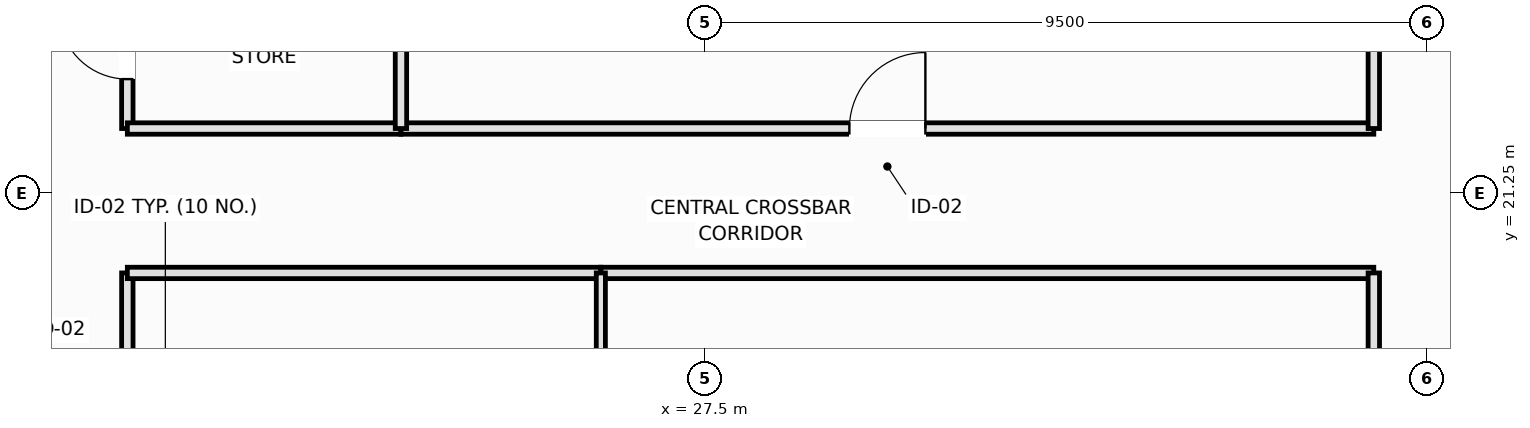
"""IFC4 building model, lengths in metres.
Left out: names, types, materials, properties, quantities, classifications, styles, units other than length and angle.
Written with IfcOpenShell. Run it as: python <this file> out.ifc"""

import sys

from ifc_helpers import new_model, si_unit, direction, frame, frame_2d, origin, place, context, subcontext, project, spatial, rectangle, extrude, element, fill, save


model = new_model("IFC4")
c1 = context("Model", 3, precision=1e-05, world=origin(), true_north=direction((0.0, 1.0)))
c2 = subcontext(c1, "Body", "Model", "MODEL_VIEW")
j1 = project(units=[si_unit("LENGTHUNIT", "METRE"), si_unit("PLANEANGLEUNIT", "RADIAN")], contexts=[c1])
p1 = place(None, origin())
s1 = spatial("IfcSite", under=j1, at=p1, CompositionType="ELEMENT")
p2 = place(p1, origin())
s2 = spatial("IfcBuilding", under=s1, at=p2, CompositionType="ELEMENT")
p3 = place(p2, frame((0.0, 0.0, 270.55)))
s3 = spatial("IfcBuildingStorey", under=s2, at=p3, CompositionType="ELEMENT", Elevation=270.55)
p4 = place(p3, frame((19.9, 15.9, 0.0), z_axis=(0.0, 0.0, 1.0), x_axis=(0.0, 1.0, 0.0)))
e1 = element("IfcWall", 1, at=p4, inside=s3, PredefinedType="PARTITIONING", context=c2, shape_type="SweptSolid", body=[
    extrude(rectangle(XDim=4.3, YDim=0.15, at=frame_2d((2.15, 0.0))), origin(), (0.0, 0.0, 1.0), 3.39),
])
p5 = place(p4, frame((1.65, 0.0, 0.0)))
e2 = element("IfcOpeningElement", 2, at=p5, cuts=e1, PredefinedType="OPENING", context=c2, shape_type="SweptSolid", body=[
    extrude(rectangle(XDim=1.0, YDim=2.15, at=frame_2d((0.5, 1.075))), frame((0.0, 0.085, 0.0), z_axis=(0.0, -1.0, 0.0), x_axis=(1.0, 0.0, 0.0)), (0.0, 0.0, 1.0), 0.17),
])
p6 = place(p3, frame((19.9, 22.1, 0.0), z_axis=(0.0, 0.0, 1.0), x_axis=(0.0, 1.0, 0.0)))
e3 = element("IfcWall", 3, at=p6, inside=s3, PredefinedType="PLUMBINGWALL", context=c2, shape_type="SweptSolid", body=[
    extrude(rectangle(XDim=2.2, YDim=0.15, at=frame_2d((1.1, 0.0))), origin(), (0.0, 0.0, 1.0), 3.39),
])
p7 = place(p6, frame((0.65, 0.0, 0.0)))
e4 = element("IfcOpeningElement", 4, at=p7, cuts=e3, PredefinedType="OPENING", context=c2, shape_type="SweptSolid", body=[
    extrude(rectangle(XDim=0.9, YDim=2.1, at=frame_2d((0.45, 1.05))), frame((0.0, 0.085, 0.0), z_axis=(0.0, -1.0, 0.0), x_axis=(1.0, 0.0, 0.0)), (0.0, 0.0, 1.0), 0.17),
])
p8 = place(p3, frame((19.9, 20.2, 0.0), z_axis=(0.0, 0.0, 1.0), x_axis=(1.0, 0.0, 0.0)))
e5 = element("IfcWall", 5, at=p8, inside=s3, PredefinedType="PARTITIONING", context=c2, shape_type="SweptSolid", body=[
    extrude(rectangle(XDim=6.23, YDim=0.15, at=frame_2d((3.115, 0.0))), origin(), (0.0, 0.0, 1.0), 3.39),
])
p9 = place(p3, frame((26.13, 20.2, 0.0), z_axis=(0.0, 0.0, 1.0), x_axis=(1.0, 0.0, 0.0)))
e6 = element("IfcWall", 6, at=p9, inside=s3, PredefinedType="PARTITIONING", context=c2, shape_type="SweptSolid", body=[
    extrude(rectangle(XDim=10.17, YDim=0.15, at=frame_2d((5.085, 0.0))), origin(), (0.0, 0.0, 1.0), 3.39),
])
p10 = place(p3, frame((19.9, 22.1, 0.0), z_axis=(0.0, 0.0, 1.0), x_axis=(1.0, 0.0, 0.0)))
e7 = element("IfcWall", 7, at=p10, inside=s3, PredefinedType="PLUMBINGWALL", context=c2, shape_type="SweptSolid", body=[
    extrude(rectangle(XDim=3.6, YDim=0.15, at=frame_2d((1.8, 0.0))), origin(), (0.0, 0.0, 1.0), 3.39),
])
p11 = place(p3, frame((23.5, 22.1, 0.0), z_axis=(0.0, 0.0, 1.0), x_axis=(1.0, 0.0, 0.0)))
e8 = element("IfcWall", 8, at=p11, inside=s3, PredefinedType="PARTITIONING", context=c2, shape_type="SweptSolid", body=[
    extrude(rectangle(XDim=12.8, YDim=0.15, at=frame_2d((6.4, 0.0))), origin(), (0.0, 0.0, 1.0), 3.39),
])
p12 = place(p11, frame((5.9, 0.0, 0.0)))
e9 = element("IfcOpeningElement", 9, at=p12, cuts=e8, PredefinedType="OPENING", context=c2, shape_type="SweptSolid", body=[
    extrude(rectangle(XDim=1.0, YDim=2.15, at=frame_2d((0.5, 1.075))), frame((0.0, 0.085, 0.0), z_axis=(0.0, -1.0, 0.0), x_axis=(1.0, 0.0, 0.0)), (0.0, 0.0, 1.0), 0.17),
])
p13 = place(p3, frame((36.3, 15.9, 0.0), z_axis=(0.0, 0.0, 1.0), x_axis=(0.0, 1.0, 0.0)))
e10 = element("IfcWall", 10, at=p13, inside=s3, PredefinedType="PARTITIONING", context=c2, shape_type="SweptSolid", body=[
    extrude(rectangle(XDim=4.3, YDim=0.15, at=frame_2d((2.15, 0.0))), origin(), (0.0, 0.0, 1.0), 3.39),
])
p14 = place(p13, frame((1.65, 0.0, 0.0)))
e11 = element("IfcOpeningElement", 11, at=p14, cuts=e10, PredefinedType="OPENING", context=c2, shape_type="SweptSolid", body=[
    extrude(rectangle(XDim=1.0, YDim=2.15, at=frame_2d((0.5, 1.075))), frame((0.0, 0.085, 0.0), z_axis=(0.0, -1.0, 0.0), x_axis=(1.0, 0.0, 0.0)), (0.0, 0.0, 1.0), 0.17),
])
p15 = place(p3, frame((36.3, 22.1, 0.0), z_axis=(0.0, 0.0, 1.0), x_axis=(0.0, 1.0, 0.0)))
e12 = element("IfcWall", 12, at=p15, inside=s3, PredefinedType="PARTITIONING", context=c2, shape_type="SweptSolid", body=[
    extrude(rectangle(XDim=10.6, YDim=0.15, at=frame_2d((5.3, 0.0))), origin(), (0.0, 0.0, 1.0), 3.39),
])
p16 = place(p3, frame((26.13, 15.9, 0.0), z_axis=(0.0, 0.0, 1.0), x_axis=(0.0, 1.0, 0.0)))
e13 = element("IfcWall", 13, at=p16, inside=s3, PredefinedType="PARTITIONING", context=c2, shape_type="SweptSolid", body=[
    extrude(rectangle(XDim=4.3, YDim=0.12, at=frame_2d((2.15, 0.0))), origin(), (0.0, 0.0, 1.0), 3.39),
])
p17 = place(p3, frame((23.5, 22.1, 0.0), z_axis=(0.0, 0.0, 1.0), x_axis=(0.0, 1.0, 0.0)))
e14 = element("IfcWall", 14, at=p17, inside=s3, PredefinedType="PLUMBINGWALL", context=c2, shape_type="SweptSolid", body=[
    extrude(rectangle(XDim=2.2, YDim=0.15, at=frame_2d((1.1, 0.0))), origin(), (0.0, 0.0, 1.0), 3.39),
])
p18 = place(p7, origin())
e15 = element("IfcDoor", 15, at=p18, inside=s3, OperationType="SINGLE_SWING_RIGHT", PredefinedType="DOOR", context=c2, shape_type="SweptSolid", body=[
    extrude(rectangle(XDim=0.9, YDim=2.1, at=frame_2d((0.45, 1.05))), frame((0.0, 0.025, 0.0), z_axis=(0.0, -1.0, 0.0), x_axis=(1.0, 0.0, 0.0)), (0.0, 0.0, 1.0), 0.05),
])
fill(e4, e15)
p19 = place(p12, origin())
e16 = element("IfcDoor", 16, at=p19, inside=s3, OperationType="SINGLE_SWING_RIGHT", PredefinedType="DOOR", context=c2, shape_type="SweptSolid", body=[
    extrude(rectangle(XDim=1.0, YDim=2.15, at=frame_2d((0.5, 1.075))), frame((0.0, 0.025, 0.0), z_axis=(0.0, -1.0, 0.0), x_axis=(1.0, 0.0, 0.0)), (0.0, 0.0, 1.0), 0.05),
])
fill(e9, e16)
save(model, sys.argv[1])
